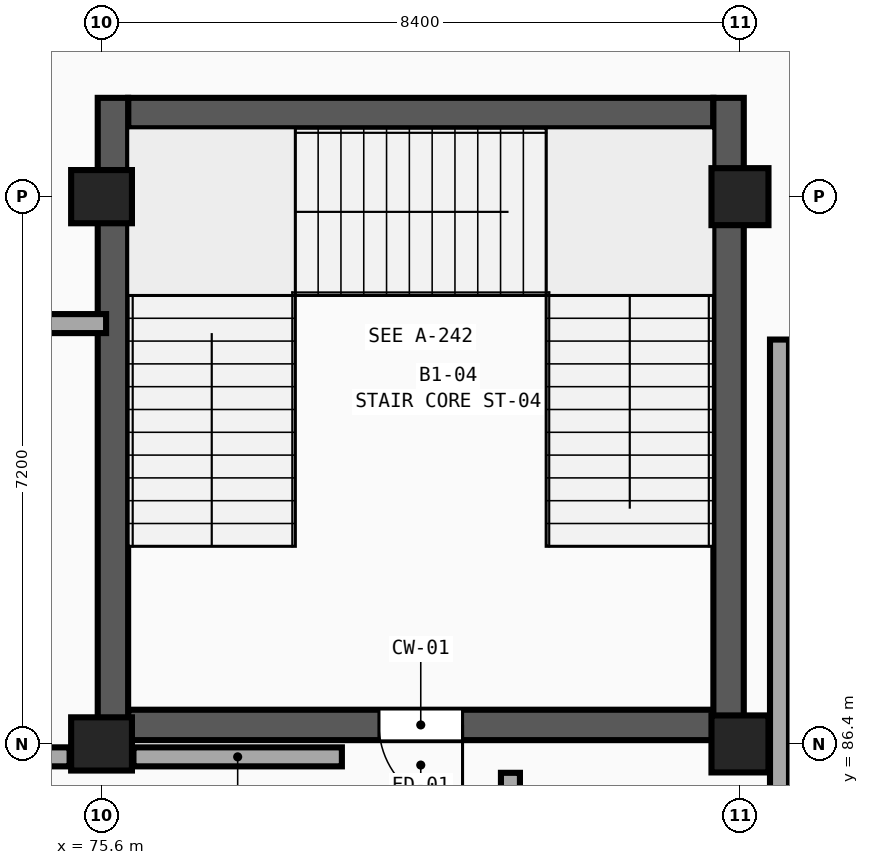
"""IFC4 building model, lengths in metres.
Left out: names, types, materials, properties, quantities, classifications, styles, units other than length and angle.
Written with IfcOpenShell. Run it as: python <this file> out.ifc"""

import sys

from ifc_helpers import new_model, si_unit, direction, frame, frame_2d, origin, origin_2d, place, context, subcontext, project, spatial, rectangle, extrude, element, fill, save


model = new_model("IFC4")
c1 = context("Model", 3, precision=1e-05, world=origin(), true_north=direction((0.0, 1.0)))
c2 = subcontext(c1, "Body", "Model", "MODEL_VIEW")
j1 = project(units=[si_unit("LENGTHUNIT", "METRE"), si_unit("PLANEANGLEUNIT", "RADIAN")], contexts=[c1])
p1 = place(None, origin())
s1 = spatial("IfcSite", under=j1, at=p1, CompositionType="ELEMENT")
p2 = place(p1, origin())
s2 = spatial("IfcBuilding", under=s1, at=p2, CompositionType="ELEMENT")
p3 = place(p2, frame((0.0, 0.0, -5.4)))
s3 = spatial("IfcBuildingStorey", under=s2, at=p3, CompositionType="ELEMENT", Elevation=-5.4)
for number, where, z_axis, x_axis in (
    (1, (75.6, 86.4, 0.0), (0.0, 0.0, 1.0), (1.0, 0.0, 0.0)),
    (2, (75.6, 93.6, 0.0), (0.0, 0.0, 1.0), (1.0, 0.0, 0.0)),
):
    element("IfcColumn", number, at=place(p3, frame(where, z_axis=z_axis, x_axis=x_axis)), inside=s3, PredefinedType="COLUMN", context=c2, shape_type="SweptSolid", body=[
        extrude(rectangle(XDim=0.8, YDim=0.7, at=origin_2d()), origin(), (0.0, 0.0, 1.0), 5.4),
    ])
for number, where, z_axis, x_axis in (
    (3, (84.0, 86.4, 0.0), (0.0, 0.0, 1.0), (1.0, 0.0, 0.0)),
    (4, (84.0, 93.6, 0.0), (0.0, 0.0, 1.0), (1.0, 0.0, 0.0)),
):
    element("IfcColumn", number, at=place(p3, frame(where, z_axis=z_axis, x_axis=x_axis)), inside=s3, PredefinedType="COLUMN", context=c2, shape_type="SweptSolid", body=[
        extrude(rectangle(XDim=0.75, YDim=0.75, at=origin_2d()), origin(), (0.0, 0.0, 1.0), 5.4),
    ])
p4 = place(p3, frame((83.65, 86.65, 0.0), z_axis=(0.0, 0.0, 1.0), x_axis=(-1.0, 0.0, 0.0)))
e5 = element("IfcWall", 5, at=p4, inside=s3, PredefinedType="SHEAR", context=c2, shape_type="SweptSolid", body=[
    extrude(rectangle(XDim=7.7, YDim=0.4, at=frame_2d((3.85, 0.0))), origin(), (0.0, 0.0, 1.0), 5.4),
])
p5 = place(p4, frame((3.3, 0.0, 0.0)))
e6 = element("IfcOpeningElement", 6, at=p5, cuts=e5, PredefinedType="OPENING", context=c2, shape_type="SweptSolid", body=[
    extrude(rectangle(XDim=1.1, YDim=2.2, at=frame_2d((0.55, 1.1))), frame((0.0, 0.22, 0.0), z_axis=(0.0, -1.0, 0.0), x_axis=(1.0, 0.0, 0.0)), (0.0, 0.0, 1.0), 0.44),
])
p6 = place(p3, frame((75.95, 94.7, 0.0), z_axis=(0.0, 0.0, 1.0), x_axis=(1.0, 0.0, 0.0)))
e7 = element("IfcWall", 7, at=p6, inside=s3, PredefinedType="SHEAR", context=c2, shape_type="SweptSolid", body=[
    extrude(rectangle(XDim=7.7, YDim=0.4, at=frame_2d((3.85, 0.0))), origin(), (0.0, 0.0, 1.0), 5.4),
])
for number, where, z_axis, x_axis in (
    (8, (75.75, 94.9, 0.0), (0.0, 0.0, 1.0), (0.0, -1.0, 0.0)),
    (9, (83.85, 86.45, 0.0), (0.0, 0.0, 1.0), (0.0, 1.0, 0.0)),
):
    element("IfcWall", number, at=place(p3, frame(where, z_axis=z_axis, x_axis=x_axis)), inside=s3, PredefinedType="SHEAR", context=c2, shape_type="SweptSolid", body=[
        extrude(rectangle(XDim=8.45, YDim=0.4, at=frame_2d((4.225, 0.0))), origin(), (0.0, 0.0, 1.0), 5.4),
    ])
p7 = place(p3, frame((73.01, 86.23, 0.0), z_axis=(0.0, 0.0, 1.0), x_axis=(1.0, 0.0, 0.0)))
e10 = element("IfcWall", 10, at=p7, inside=s3, PredefinedType="SOLIDWALL", context=c2, shape_type="SweptSolid", body=[
    extrude(rectangle(XDim=2.17, YDim=0.25, at=frame_2d((1.085, 0.0))), origin(), (0.0, 0.0, 1.0), 4.55),
])
p8 = place(p7, frame((0.202, 0.0, 0.0)))
e11 = element("IfcOpeningElement", 11, at=p8, cuts=e10, PredefinedType="OPENING", context=c2, shape_type="SweptSolid", body=[
    extrude(rectangle(XDim=1.05, YDim=2.15, at=frame_2d((0.525, 1.075))), frame((0.0, 0.145, 0.0), z_axis=(0.0, -1.0, 0.0), x_axis=(1.0, 0.0, 0.0)), (0.0, 0.0, 1.0), 0.29),
])
p9 = place(p3, frame((76.02, 86.23, 0.0), z_axis=(0.0, 0.0, 1.0), x_axis=(1.0, 0.0, 0.0)))
e12 = element("IfcWall", 12, at=p9, inside=s3, PredefinedType="SOLIDWALL", context=c2, shape_type="SweptSolid", body=[
    extrude(rectangle(XDim=2.742, YDim=0.25, at=frame_2d((1.371, 0.0))), origin(), (0.0, 0.0, 1.0), 4.55),
])
p10 = place(p3, frame((80.98, 84.18, 0.0), z_axis=(0.0, 0.0, 1.0), x_axis=(0.0, 1.0, 0.0)))
e13 = element("IfcWall", 13, at=p10, inside=s3, PredefinedType="SOLIDWALL", context=c2, shape_type="SweptSolid", body=[
    extrude(rectangle(XDim=1.84, YDim=0.25, at=frame_2d((0.92, 0.0))), origin(), (0.0, 0.0, 1.0), 5.05),
])
p11 = place(p10, frame((0.47, 0.0, 0.0)))
e14 = element("IfcOpeningElement", 14, at=p11, cuts=e13, PredefinedType="OPENING", context=c2, shape_type="SweptSolid", body=[
    extrude(rectangle(XDim=0.9, YDim=2.1, at=frame_2d((0.45, 1.05))), frame((0.0, 0.145, 0.0), z_axis=(0.0, -1.0, 0.0), x_axis=(1.0, 0.0, 0.0)), (0.0, 0.0, 1.0), 0.29),
])
p12 = place(p3, frame((84.52, 77.01, 0.0), z_axis=(0.0, 0.0, 1.0), x_axis=(0.0, 1.0, 0.0)))
e15 = element("IfcWall", 15, at=p12, inside=s3, PredefinedType="SOLIDWALL", context=c2, shape_type="SweptSolid", body=[
    extrude(rectangle(XDim=14.71, YDim=0.25, at=frame_2d((7.355, 0.0))), origin(), (0.0, 0.0, 1.0), 4.55),
])
p13 = place(p3, frame((73.01, 91.93, 0.0), z_axis=(0.0, 0.0, 1.0), x_axis=(1.0, 0.0, 0.0)))
e16 = element("IfcWall", 16, at=p13, inside=s3, PredefinedType="SOLIDWALL", context=c2, shape_type="SweptSolid", body=[
    extrude(rectangle(XDim=2.65, YDim=0.25, at=frame_2d((1.325, 0.0))), origin(), (0.0, 0.0, 1.0), 5.05),
])
p14 = place(p5, origin())
e17 = element("IfcDoor", 17, at=p14, inside=s3, OperationType="SINGLE_SWING_LEFT", PredefinedType="DOOR", context=c2, shape_type="SweptSolid", body=[
    extrude(rectangle(XDim=1.1, YDim=2.2, at=frame_2d((0.55, 1.1))), frame((0.0, 0.025, 0.0), z_axis=(0.0, -1.0, 0.0), x_axis=(1.0, 0.0, 0.0)), (0.0, 0.0, 1.0), 0.05),
])
fill(e6, e17)
save(model, sys.argv[1])
